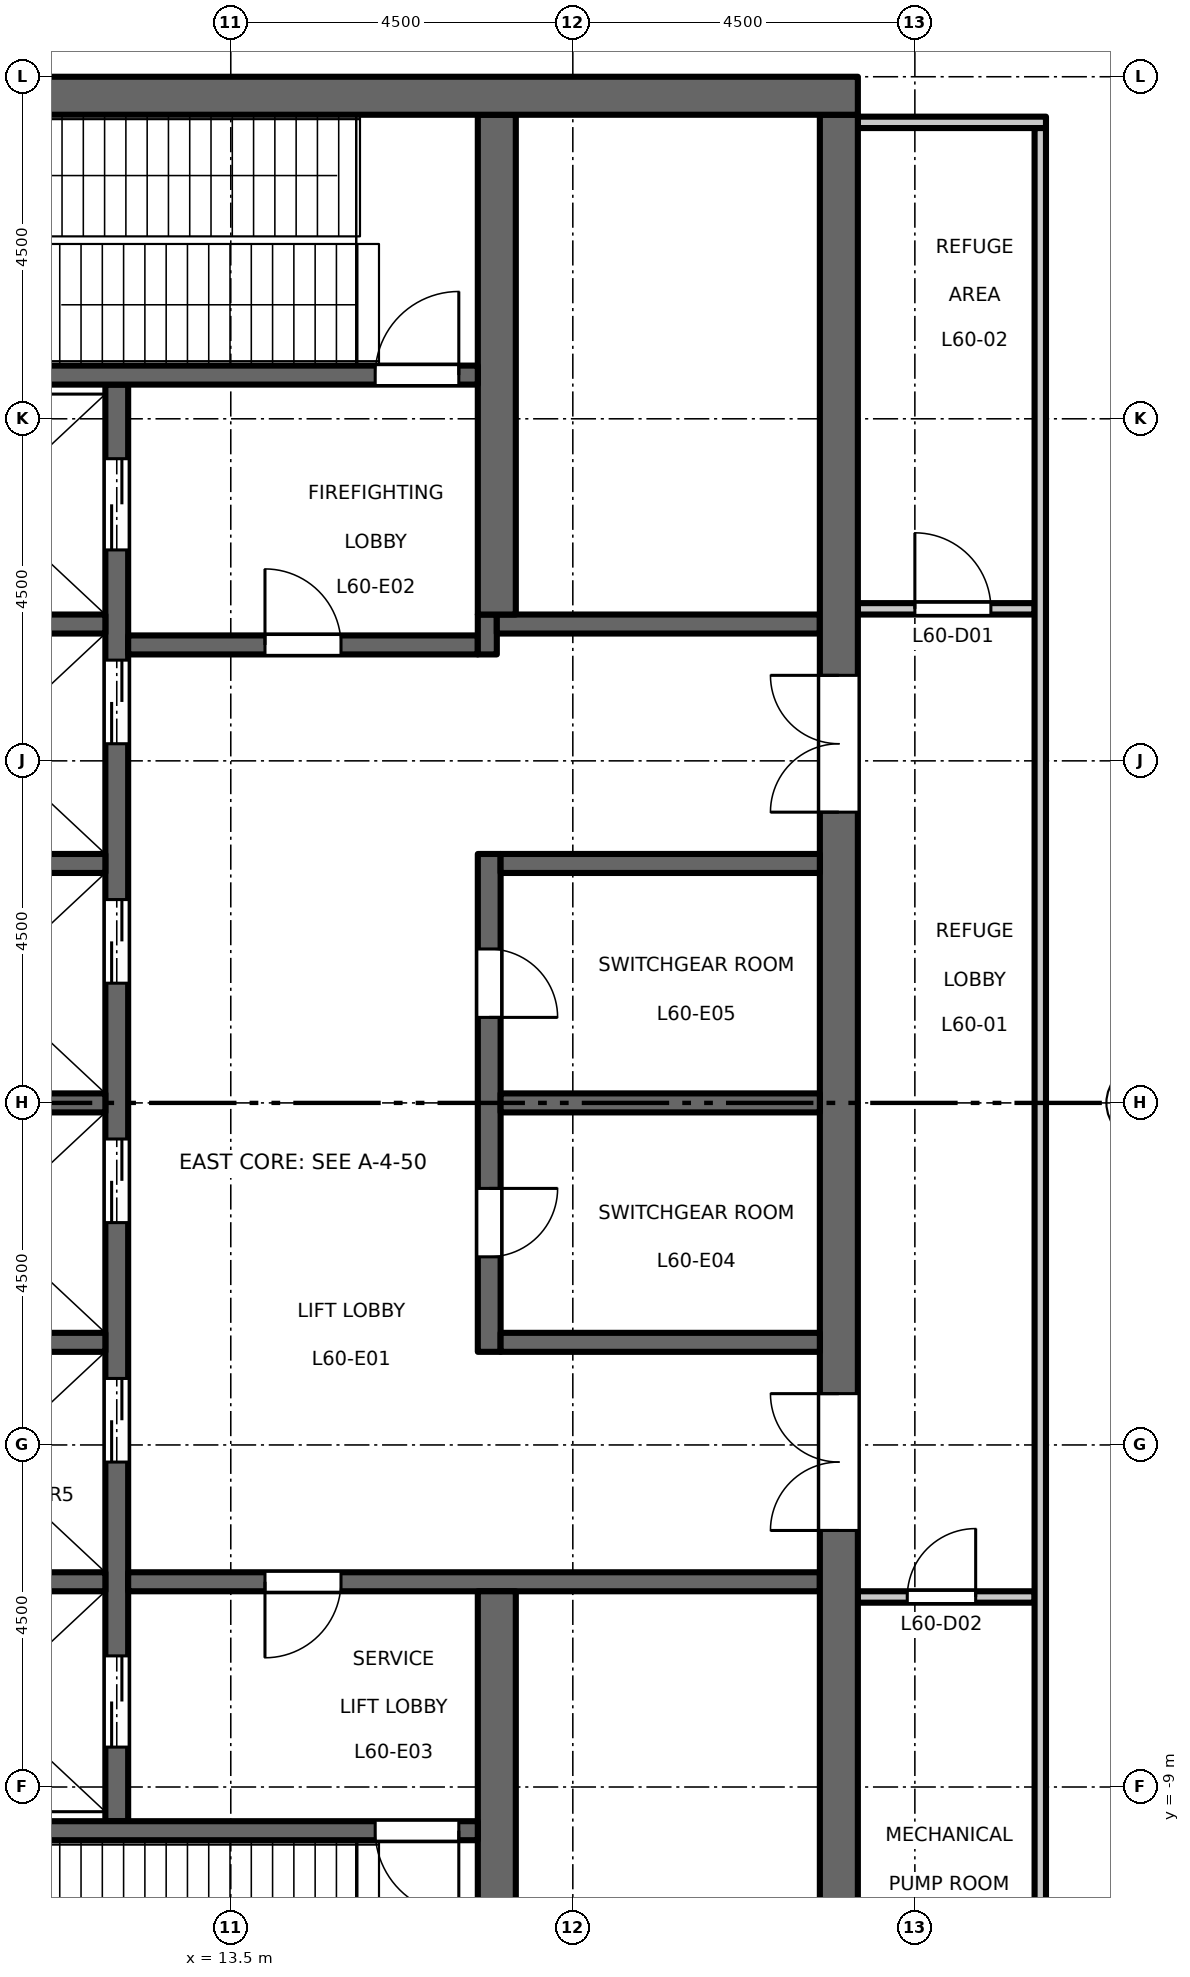
"""IFC4 building model, lengths in metres.
Left out: names, types, materials, properties, quantities, classifications, styles, units other than length and angle.
Written with IfcOpenShell. Run it as: python <this file> out.ifc"""

import sys

from ifc_helpers import new_model, si_unit, direction, frame, frame_2d, origin, place, context, subcontext, project, spatial, rectangle, extrude, element, fill, save


model = new_model("IFC4")
c1 = context("Model", 3, precision=1e-05, world=origin(), true_north=direction((0.0, 1.0)))
c2 = subcontext(c1, "Body", "Model", "MODEL_VIEW")
j1 = project(units=[si_unit("LENGTHUNIT", "METRE"), si_unit("PLANEANGLEUNIT", "RADIAN")], contexts=[c1])
p1 = place(None, origin())
s1 = spatial("IfcSite", under=j1, at=p1, CompositionType="ELEMENT")
p2 = place(p1, origin())
s2 = spatial("IfcBuilding", under=s1, at=p2, CompositionType="ELEMENT")
p3 = place(p2, frame((0.0, 0.0, 278.2)))
s3 = spatial("IfcBuildingStorey", under=s2, at=p3, CompositionType="ELEMENT", Elevation=278.2)
p4 = place(p3, frame((12.0, -9.45, 0.0), z_axis=(0.0, 0.0, 1.0), x_axis=(0.0, 1.0, 0.0)))
e1 = element("IfcWall", 1, at=p4, inside=s3, PredefinedType="SHEAR", context=c2, shape_type="SweptSolid", body=[
    extrude(rectangle(XDim=18.9, YDim=0.3, at=frame_2d((9.45, 0.0))), origin(), (0.0, 0.0, 1.0), 5.8),
])
p5 = place(p4, frame((4.725, 0.0, 0.0)))
e2 = element("IfcOpeningElement", 2, at=p5, cuts=e1, PredefinedType="OPENING", context=c2, shape_type="SweptSolid", body=[
    extrude(rectangle(XDim=1.1, YDim=2.1, at=frame_2d((0.55, 1.05))), frame((0.0, 0.16, 0.0), z_axis=(0.0, -1.0, 0.0), x_axis=(1.0, 0.0, 0.0)), (0.0, 0.0, 1.0), 0.32),
])
p6 = place(p4, frame((7.875, 0.0, 0.0)))
e3 = element("IfcOpeningElement", 3, at=p6, cuts=e1, PredefinedType="OPENING", context=c2, shape_type="SweptSolid", body=[
    extrude(rectangle(XDim=1.1, YDim=2.1, at=frame_2d((0.55, 1.05))), frame((0.0, 0.16, 0.0), z_axis=(0.0, -1.0, 0.0), x_axis=(1.0, 0.0, 0.0)), (0.0, 0.0, 1.0), 0.32),
])
p7 = place(p4, frame((11.025, 0.0, 0.0)))
e4 = element("IfcOpeningElement", 4, at=p7, cuts=e1, PredefinedType="OPENING", context=c2, shape_type="SweptSolid", body=[
    extrude(rectangle(XDim=1.1, YDim=2.1, at=frame_2d((0.55, 1.05))), frame((0.0, 0.16, 0.0), z_axis=(0.0, -1.0, 0.0), x_axis=(1.0, 0.0, 0.0)), (0.0, 0.0, 1.0), 0.32),
])
p8 = place(p4, frame((14.175, 0.0, 0.0)))
e5 = element("IfcOpeningElement", 5, at=p8, cuts=e1, PredefinedType="OPENING", context=c2, shape_type="SweptSolid", body=[
    extrude(rectangle(XDim=1.1, YDim=2.1, at=frame_2d((0.55, 1.05))), frame((0.0, 0.16, 0.0), z_axis=(0.0, -1.0, 0.0), x_axis=(1.0, 0.0, 0.0)), (0.0, 0.0, 1.0), 0.32),
])
p9 = place(p4, frame((16.725, 0.0, 0.0)))
e6 = element("IfcOpeningElement", 6, at=p9, cuts=e1, PredefinedType="OPENING", context=c2, shape_type="SweptSolid", body=[
    extrude(rectangle(XDim=1.2, YDim=2.1, at=frame_2d((0.6, 1.05))), frame((0.0, 0.16, 0.0), z_axis=(0.0, -1.0, 0.0), x_axis=(1.0, 0.0, 0.0)), (0.0, 0.0, 1.0), 0.32),
])
p10 = place(p4, frame((0.975, 0.0, 0.0)))
e7 = element("IfcOpeningElement", 7, at=p10, cuts=e1, PredefinedType="OPENING", context=c2, shape_type="SweptSolid", body=[
    extrude(rectangle(XDim=1.2, YDim=2.1, at=frame_2d((0.6, 1.05))), frame((0.0, 0.16, 0.0), z_axis=(0.0, -1.0, 0.0), x_axis=(1.0, 0.0, 0.0)), (0.0, 0.0, 1.0), 0.32),
])
p11 = place(p3, frame((12.15, 6.025, 0.0), z_axis=(0.0, 0.0, 1.0), x_axis=(1.0, 0.0, 0.0)))
e8 = element("IfcWall", 8, at=p11, inside=s3, PredefinedType="SHEAR", context=c2, shape_type="SweptSolid", body=[
    extrude(rectangle(XDim=4.6, YDim=0.25, at=frame_2d((2.3, 0.0))), origin(), (0.0, 0.0, 1.0), 5.8),
])
p12 = place(p11, frame((1.8, 0.0, 0.0)))
e9 = element("IfcOpeningElement", 9, at=p12, cuts=e8, PredefinedType="OPENING", context=c2, shape_type="SweptSolid", body=[
    extrude(rectangle(XDim=1.0, YDim=2.1, at=frame_2d((0.5, 1.05))), frame((0.0, 0.135, 0.0), z_axis=(0.0, -1.0, 0.0), x_axis=(1.0, 0.0, 0.0)), (0.0, 0.0, 1.0), 0.27),
])
p13 = place(p3, frame((16.875, 5.9, 0.0), z_axis=(0.0, 0.0, 1.0), x_axis=(0.0, 1.0, 0.0)))
e10 = element("IfcWall", 10, at=p13, inside=s3, PredefinedType="SHEAR", context=c2, shape_type="SweptSolid", body=[
    extrude(rectangle(XDim=0.525, YDim=0.25, at=frame_2d((0.263, 0.0))), origin(), (0.0, 0.0, 1.0), 5.8),
])
p14 = place(p3, frame((17.0, 6.3, 0.0), z_axis=(0.0, 0.0, 1.0), x_axis=(1.0, 0.0, 0.0)))
e11 = element("IfcWall", 11, at=p14, inside=s3, PredefinedType="SHEAR", context=c2, shape_type="SweptSolid", body=[
    extrude(rectangle(XDim=4.25, YDim=0.25, at=frame_2d((2.125, 0.0))), origin(), (0.0, 0.0, 1.0), 5.8),
])
p15 = place(p3, frame((12.15, -6.3, 0.0), z_axis=(0.0, 0.0, 1.0), x_axis=(1.0, 0.0, 0.0)))
e12 = element("IfcWall", 12, at=p15, inside=s3, PredefinedType="SHEAR", context=c2, shape_type="SweptSolid", body=[
    extrude(rectangle(XDim=9.1, YDim=0.25, at=frame_2d((4.55, 0.0))), origin(), (0.0, 0.0, 1.0), 5.8),
])
p16 = place(p15, frame((1.8, 0.0, 0.0)))
e13 = element("IfcOpeningElement", 13, at=p16, cuts=e12, PredefinedType="OPENING", context=c2, shape_type="SweptSolid", body=[
    extrude(rectangle(XDim=1.0, YDim=2.1, at=frame_2d((0.5, 1.05))), frame((0.0, 0.135, 0.0), z_axis=(0.0, -1.0, 0.0), x_axis=(1.0, 0.0, 0.0)), (0.0, 0.0, 1.0), 0.27),
])
p17 = place(p3, frame((21.5, -13.0, 0.0), z_axis=(0.0, 0.0, 1.0), x_axis=(0.0, 1.0, 0.0)))
e14 = element("IfcWall", 14, at=p17, inside=s3, PredefinedType="SHEAR", context=c2, shape_type="SweptSolid", body=[
    extrude(rectangle(XDim=26.0, YDim=0.5, at=frame_2d((13.0, 0.0))), origin(), (0.0, 0.0, 1.0), 5.8),
])
p18 = place(p17, frame((16.825, 0.0, 0.0)))
e15 = element("IfcOpeningElement", 15, at=p18, cuts=e14, PredefinedType="OPENING", context=c2, shape_type="SweptSolid", body=[
    extrude(rectangle(XDim=1.8, YDim=2.1, at=frame_2d((0.9, 1.05))), frame((0.0, 0.26, 0.0), z_axis=(0.0, -1.0, 0.0), x_axis=(1.0, 0.0, 0.0)), (0.0, 0.0, 1.0), 0.52),
])
p19 = place(p17, frame((7.375, 0.0, 0.0)))
e16 = element("IfcOpeningElement", 16, at=p19, cuts=e14, PredefinedType="OPENING", context=c2, shape_type="SweptSolid", body=[
    extrude(rectangle(XDim=1.8, YDim=2.1, at=frame_2d((0.9, 1.05))), frame((0.0, 0.26, 0.0), z_axis=(0.0, -1.0, 0.0), x_axis=(1.0, 0.0, 0.0)), (0.0, 0.0, 1.0), 0.52),
])
p20 = place(p3, frame((16.9, -3.275, 0.0), z_axis=(0.0, 0.0, 1.0), x_axis=(0.0, 1.0, 0.0)))
e17 = element("IfcWall", 17, at=p20, inside=s3, PredefinedType="SHEAR", context=c2, shape_type="SweptSolid", body=[
    extrude(rectangle(XDim=6.55, YDim=0.3, at=frame_2d((3.275, 0.0))), origin(), (0.0, 0.0, 1.0), 5.8),
])
p21 = place(p20, frame((1.25, 0.0, 0.0)))
e18 = element("IfcOpeningElement", 18, at=p21, cuts=e17, PredefinedType="OPENING", context=c2, shape_type="SweptSolid", body=[
    extrude(rectangle(XDim=0.9, YDim=2.1, at=frame_2d((0.45, 1.05))), frame((0.0, 0.16, 0.0), z_axis=(0.0, -1.0, 0.0), x_axis=(1.0, 0.0, 0.0)), (0.0, 0.0, 1.0), 0.32),
])
p22 = place(p20, frame((4.4, 0.0, 0.0)))
e19 = element("IfcOpeningElement", 19, at=p22, cuts=e17, PredefinedType="OPENING", context=c2, shape_type="SweptSolid", body=[
    extrude(rectangle(XDim=0.9, YDim=2.1, at=frame_2d((0.45, 1.05))), frame((0.0, 0.16, 0.0), z_axis=(0.0, -1.0, 0.0), x_axis=(1.0, 0.0, 0.0)), (0.0, 0.0, 1.0), 0.32),
])
for number, where, z_axis, x_axis in (
    (20, (17.05, 0.0, 0.0), (0.0, 0.0, 1.0), (1.0, 0.0, 0.0)),
    (21, (17.05, 3.15, 0.0), (0.0, 0.0, 1.0), (1.0, 0.0, 0.0)),
    (22, (17.05, -3.15, 0.0), (0.0, 0.0, 1.0), (1.0, 0.0, 0.0)),
):
    element("IfcWall", number, at=place(p3, frame(where, z_axis=z_axis, x_axis=x_axis)), inside=s3, PredefinedType="SHEAR", context=c2, shape_type="SweptSolid", body=[
        extrude(rectangle(XDim=4.2, YDim=0.25, at=frame_2d((2.1, 0.0))), origin(), (0.0, 0.0, 1.0), 5.8),
    ])
for number, where, z_axis, x_axis in (
    (23, (17.0, 6.425, 0.0), (0.0, 0.0, 1.0), (0.0, 1.0, 0.0)),
    (24, (17.0, -13.0, 0.0), (0.0, 0.0, 1.0), (0.0, 1.0, 0.0)),
):
    element("IfcWall", number, at=place(p3, frame(where, z_axis=z_axis, x_axis=x_axis)), inside=s3, PredefinedType="SHEAR", context=c2, shape_type="SweptSolid", body=[
        extrude(rectangle(XDim=6.575, YDim=0.5, at=frame_2d((3.288, 0.0))), origin(), (0.0, 0.0, 1.0), 5.8),
    ])
for number, where, z_axis, x_axis in (
    (25, (8.75, 0.0, 0.0), (0.0, 0.0, 1.0), (1.0, 0.0, 0.0)),
    (26, (8.75, 3.15, 0.0), (0.0, 0.0, 1.0), (1.0, 0.0, 0.0)),
    (27, (8.75, 6.3, 0.0), (0.0, 0.0, 1.0), (1.0, 0.0, 0.0)),
    (28, (8.75, -3.15, 0.0), (0.0, 0.0, 1.0), (1.0, 0.0, 0.0)),
    (29, (8.75, -6.3, 0.0), (0.0, 0.0, 1.0), (1.0, 0.0, 0.0)),
):
    element("IfcWall", number, at=place(p3, frame(where, z_axis=z_axis, x_axis=x_axis)), inside=s3, PredefinedType="SHEAR", context=c2, shape_type="SweptSolid", body=[
        extrude(rectangle(XDim=3.1, YDim=0.25, at=frame_2d((1.55, 0.0))), origin(), (0.0, 0.0, 1.0), 5.8),
    ])
p23 = place(p3, frame((8.75, 9.575, 0.0), z_axis=(0.0, 0.0, 1.0), x_axis=(1.0, 0.0, 0.0)))
e30 = element("IfcWall", 30, at=p23, inside=s3, PredefinedType="SHEAR", context=c2, shape_type="SweptSolid", body=[
    extrude(rectangle(XDim=8.0, YDim=0.25, at=frame_2d((4.0, 0.0))), origin(), (0.0, 0.0, 1.0), 5.8),
])
p24 = place(p23, frame((6.65, 0.0, 0.0)))
e31 = element("IfcOpeningElement", 31, at=p24, cuts=e30, PredefinedType="OPENING", context=c2, shape_type="SweptSolid", body=[
    extrude(rectangle(XDim=1.1, YDim=2.1, at=frame_2d((0.55, 1.05))), frame((0.0, 0.135, 0.0), z_axis=(0.0, -1.0, 0.0), x_axis=(1.0, 0.0, 0.0)), (0.0, 0.0, 1.0), 0.27),
])
p25 = place(p3, frame((8.75, -9.575, 0.0), z_axis=(0.0, 0.0, 1.0), x_axis=(1.0, 0.0, 0.0)))
e32 = element("IfcWall", 32, at=p25, inside=s3, PredefinedType="SHEAR", context=c2, shape_type="SweptSolid", body=[
    extrude(rectangle(XDim=8.0, YDim=0.25, at=frame_2d((4.0, 0.0))), origin(), (0.0, 0.0, 1.0), 5.8),
])
p26 = place(p25, frame((6.65, 0.0, 0.0)))
e33 = element("IfcOpeningElement", 33, at=p26, cuts=e32, PredefinedType="OPENING", context=c2, shape_type="SweptSolid", body=[
    extrude(rectangle(XDim=1.1, YDim=2.1, at=frame_2d((0.55, 1.05))), frame((0.0, 0.135, 0.0), z_axis=(0.0, -1.0, 0.0), x_axis=(1.0, 0.0, 0.0)), (0.0, 0.0, 1.0), 0.27),
])
p27 = place(p3, frame((8.25, 13.25, 0.0), z_axis=(0.0, 0.0, 1.0), x_axis=(1.0, 0.0, 0.0)))
e34 = element("IfcWall", 34, at=p27, inside=s3, PredefinedType="SHEAR", context=c2, shape_type="SweptSolid", body=[
    extrude(rectangle(XDim=13.5, YDim=0.5, at=frame_2d((6.75, 0.0))), origin(), (0.0, 0.0, 1.0), 5.8),
])
p28 = place(p3, frame((21.75, -6.5, 0.0), z_axis=(0.0, 0.0, 1.0), x_axis=(1.0, 0.0, 0.0)))
e35 = element("IfcWall", 35, at=p28, inside=s3, PredefinedType="PARTITIONING", context=c2, shape_type="SweptSolid", body=[
    extrude(rectangle(XDim=2.325, YDim=0.15, at=frame_2d((1.163, 0.0))), origin(), (0.0, 0.0, 1.0), 5.8),
])
p29 = place(p28, frame((0.65, 0.0, 0.0)))
e36 = element("IfcOpeningElement", 36, at=p29, cuts=e35, PredefinedType="OPENING", context=c2, shape_type="SweptSolid", body=[
    extrude(rectangle(XDim=0.9, YDim=2.1, at=frame_2d((0.45, 1.05))), frame((0.0, 0.085, 0.0), z_axis=(0.0, -1.0, 0.0), x_axis=(1.0, 0.0, 0.0)), (0.0, 0.0, 1.0), 0.17),
])
p30 = place(p3, frame((21.75, 6.5, 0.0), z_axis=(0.0, 0.0, 1.0), x_axis=(1.0, 0.0, 0.0)))
e37 = element("IfcWall", 37, at=p30, inside=s3, PredefinedType="PARTITIONING", context=c2, shape_type="SweptSolid", body=[
    extrude(rectangle(XDim=2.325, YDim=0.15, at=frame_2d((1.163, 0.0))), origin(), (0.0, 0.0, 1.0), 5.8),
])
p31 = place(p30, frame((0.75, 0.0, 0.0)))
e38 = element("IfcOpeningElement", 38, at=p31, cuts=e37, PredefinedType="OPENING", context=c2, shape_type="SweptSolid", body=[
    extrude(rectangle(XDim=1.0, YDim=2.1, at=frame_2d((0.5, 1.05))), frame((0.0, 0.085, 0.0), z_axis=(0.0, -1.0, 0.0), x_axis=(1.0, 0.0, 0.0)), (0.0, 0.0, 1.0), 0.17),
])
p32 = place(p3, frame((21.75, 12.9, 0.0), z_axis=(0.0, 0.0, 1.0), x_axis=(1.0, 0.0, 0.0)))
e39 = element("IfcWall", 39, at=p32, inside=s3, PredefinedType="PARTITIONING", context=c2, shape_type="SweptSolid", body=[
    extrude(rectangle(XDim=2.475, YDim=0.15, at=frame_2d((1.238, 0.0))), origin(), (0.0, 0.0, 1.0), 5.8),
])
p33 = place(p3, frame((24.15, -12.825, 0.0), z_axis=(0.0, 0.0, 1.0), x_axis=(0.0, 1.0, 0.0)))
e40 = element("IfcWall", 40, at=p33, inside=s3, PredefinedType="PARTITIONING", context=c2, shape_type="SweptSolid", body=[
    extrude(rectangle(XDim=25.65, YDim=0.15, at=frame_2d((12.825, 0.0))), origin(), (0.0, 0.0, 1.0), 5.8),
])
p34 = place(p12, origin())
e41 = element("IfcDoor", 41, at=p34, inside=s3, OperationType="SINGLE_SWING_RIGHT", PredefinedType="DOOR", context=c2, shape_type="SweptSolid", body=[
    extrude(rectangle(XDim=1.0, YDim=2.1, at=frame_2d((0.5, 1.05))), frame((0.0, 0.025, 0.0), z_axis=(0.0, -1.0, 0.0), x_axis=(1.0, 0.0, 0.0)), (0.0, 0.0, 1.0), 0.05),
])
fill(e9, e41)
p35 = place(p16, origin())
e42 = element("IfcDoor", 42, at=p35, inside=s3, OperationType="SINGLE_SWING_LEFT", PredefinedType="DOOR", context=c2, shape_type="SweptSolid", body=[
    extrude(rectangle(XDim=1.0, YDim=2.1, at=frame_2d((0.5, 1.05))), frame((0.0, 0.025, 0.0), z_axis=(0.0, -1.0, 0.0), x_axis=(1.0, 0.0, 0.0)), (0.0, 0.0, 1.0), 0.05),
])
fill(e13, e42)
p36 = place(p24, origin())
e43 = element("IfcDoor", 43, at=p36, inside=s3, OperationType="SINGLE_SWING_LEFT", PredefinedType="DOOR", context=c2, shape_type="SweptSolid", body=[
    extrude(rectangle(XDim=1.1, YDim=2.1, at=frame_2d((0.55, 1.05))), frame((0.0, 0.025, 0.0), z_axis=(0.0, -1.0, 0.0), x_axis=(1.0, 0.0, 0.0)), (0.0, 0.0, 1.0), 0.05),
])
fill(e31, e43)
p37 = place(p26, origin())
e44 = element("IfcDoor", 44, at=p37, inside=s3, OperationType="SINGLE_SWING_RIGHT", PredefinedType="DOOR", context=c2, shape_type="SweptSolid", body=[
    extrude(rectangle(XDim=1.1, YDim=2.1, at=frame_2d((0.55, 1.05))), frame((0.0, 0.025, 0.0), z_axis=(0.0, -1.0, 0.0), x_axis=(1.0, 0.0, 0.0)), (0.0, 0.0, 1.0), 0.05),
])
fill(e33, e44)
p38 = place(p18, origin())
e45 = element("IfcDoor", 45, at=p38, inside=s3, OperationType="DOUBLE_DOOR_DOUBLE_SWING", PredefinedType="DOOR", context=c2, shape_type="SweptSolid", body=[
    extrude(rectangle(XDim=1.8, YDim=2.1, at=frame_2d((0.9, 1.05))), frame((0.0, 0.025, 0.0), z_axis=(0.0, -1.0, 0.0), x_axis=(1.0, 0.0, 0.0)), (0.0, 0.0, 1.0), 0.05),
])
fill(e15, e45)
p39 = place(p19, origin())
e46 = element("IfcDoor", 46, at=p39, inside=s3, OperationType="DOUBLE_DOOR_DOUBLE_SWING", PredefinedType="DOOR", context=c2, shape_type="SweptSolid", body=[
    extrude(rectangle(XDim=1.8, YDim=2.1, at=frame_2d((0.9, 1.05))), frame((0.0, 0.025, 0.0), z_axis=(0.0, -1.0, 0.0), x_axis=(1.0, 0.0, 0.0)), (0.0, 0.0, 1.0), 0.05),
])
fill(e16, e46)
p40 = place(p5, origin())
e47 = element("IfcDoor", 47, at=p40, inside=s3, OperationType="DOUBLE_DOOR_SLIDING", PredefinedType="DOOR", context=c2, shape_type="SweptSolid", body=[
    extrude(rectangle(XDim=1.1, YDim=2.1, at=frame_2d((0.55, 1.05))), frame((0.0, 0.025, 0.0), z_axis=(0.0, -1.0, 0.0), x_axis=(1.0, 0.0, 0.0)), (0.0, 0.0, 1.0), 0.05),
])
fill(e2, e47)
p41 = place(p6, origin())
e48 = element("IfcDoor", 48, at=p41, inside=s3, OperationType="DOUBLE_DOOR_SLIDING", PredefinedType="DOOR", context=c2, shape_type="SweptSolid", body=[
    extrude(rectangle(XDim=1.1, YDim=2.1, at=frame_2d((0.55, 1.05))), frame((0.0, 0.025, 0.0), z_axis=(0.0, -1.0, 0.0), x_axis=(1.0, 0.0, 0.0)), (0.0, 0.0, 1.0), 0.05),
])
fill(e3, e48)
p42 = place(p7, origin())
e49 = element("IfcDoor", 49, at=p42, inside=s3, OperationType="DOUBLE_DOOR_SLIDING", PredefinedType="DOOR", context=c2, shape_type="SweptSolid", body=[
    extrude(rectangle(XDim=1.1, YDim=2.1, at=frame_2d((0.55, 1.05))), frame((0.0, 0.025, 0.0), z_axis=(0.0, -1.0, 0.0), x_axis=(1.0, 0.0, 0.0)), (0.0, 0.0, 1.0), 0.05),
])
fill(e4, e49)
p43 = place(p8, origin())
e50 = element("IfcDoor", 50, at=p43, inside=s3, OperationType="DOUBLE_DOOR_SLIDING", PredefinedType="DOOR", context=c2, shape_type="SweptSolid", body=[
    extrude(rectangle(XDim=1.1, YDim=2.1, at=frame_2d((0.55, 1.05))), frame((0.0, 0.025, 0.0), z_axis=(0.0, -1.0, 0.0), x_axis=(1.0, 0.0, 0.0)), (0.0, 0.0, 1.0), 0.05),
])
fill(e5, e50)
p44 = place(p9, origin())
e51 = element("IfcDoor", 51, at=p44, inside=s3, OperationType="DOUBLE_DOOR_SLIDING", PredefinedType="DOOR", context=c2, shape_type="SweptSolid", body=[
    extrude(rectangle(XDim=1.2, YDim=2.1, at=frame_2d((0.6, 1.05))), frame((0.0, 0.025, 0.0), z_axis=(0.0, -1.0, 0.0), x_axis=(1.0, 0.0, 0.0)), (0.0, 0.0, 1.0), 0.05),
])
fill(e6, e51)
p45 = place(p10, origin())
e52 = element("IfcDoor", 52, at=p45, inside=s3, OperationType="DOUBLE_DOOR_SLIDING", PredefinedType="DOOR", context=c2, shape_type="SweptSolid", body=[
    extrude(rectangle(XDim=1.2, YDim=2.1, at=frame_2d((0.6, 1.05))), frame((0.0, 0.025, 0.0), z_axis=(0.0, -1.0, 0.0), x_axis=(1.0, 0.0, 0.0)), (0.0, 0.0, 1.0), 0.05),
])
fill(e7, e52)
p46 = place(p21, origin())
e53 = element("IfcDoor", 53, at=p46, inside=s3, OperationType="SINGLE_SWING_RIGHT", PredefinedType="DOOR", context=c2, shape_type="SweptSolid", body=[
    extrude(rectangle(XDim=0.9, YDim=2.1, at=frame_2d((0.45, 1.05))), frame((0.0, 0.025, 0.0), z_axis=(0.0, -1.0, 0.0), x_axis=(1.0, 0.0, 0.0)), (0.0, 0.0, 1.0), 0.05),
])
fill(e18, e53)
p47 = place(p22, origin())
e54 = element("IfcDoor", 54, at=p47, inside=s3, OperationType="SINGLE_SWING_LEFT", PredefinedType="DOOR", context=c2, shape_type="SweptSolid", body=[
    extrude(rectangle(XDim=0.9, YDim=2.1, at=frame_2d((0.45, 1.05))), frame((0.0, 0.025, 0.0), z_axis=(0.0, -1.0, 0.0), x_axis=(1.0, 0.0, 0.0)), (0.0, 0.0, 1.0), 0.05),
])
fill(e19, e54)
p48 = place(p31, origin())
e55 = element("IfcDoor", 55, at=p48, inside=s3, OperationType="SINGLE_SWING_LEFT", PredefinedType="DOOR", context=c2, shape_type="SweptSolid", body=[
    extrude(rectangle(XDim=1.0, YDim=2.1, at=frame_2d((0.5, 1.05))), frame((0.0, 0.025, 0.0), z_axis=(0.0, -1.0, 0.0), x_axis=(1.0, 0.0, 0.0)), (0.0, 0.0, 1.0), 0.05),
])
fill(e38, e55)
p49 = place(p29, origin())
e56 = element("IfcDoor", 56, at=p49, inside=s3, OperationType="SINGLE_SWING_RIGHT", PredefinedType="DOOR", context=c2, shape_type="SweptSolid", body=[
    extrude(rectangle(XDim=0.9, YDim=2.1, at=frame_2d((0.45, 1.05))), frame((0.0, 0.025, 0.0), z_axis=(0.0, -1.0, 0.0), x_axis=(1.0, 0.0, 0.0)), (0.0, 0.0, 1.0), 0.05),
])
fill(e36, e56)
save(model, sys.argv[1])
